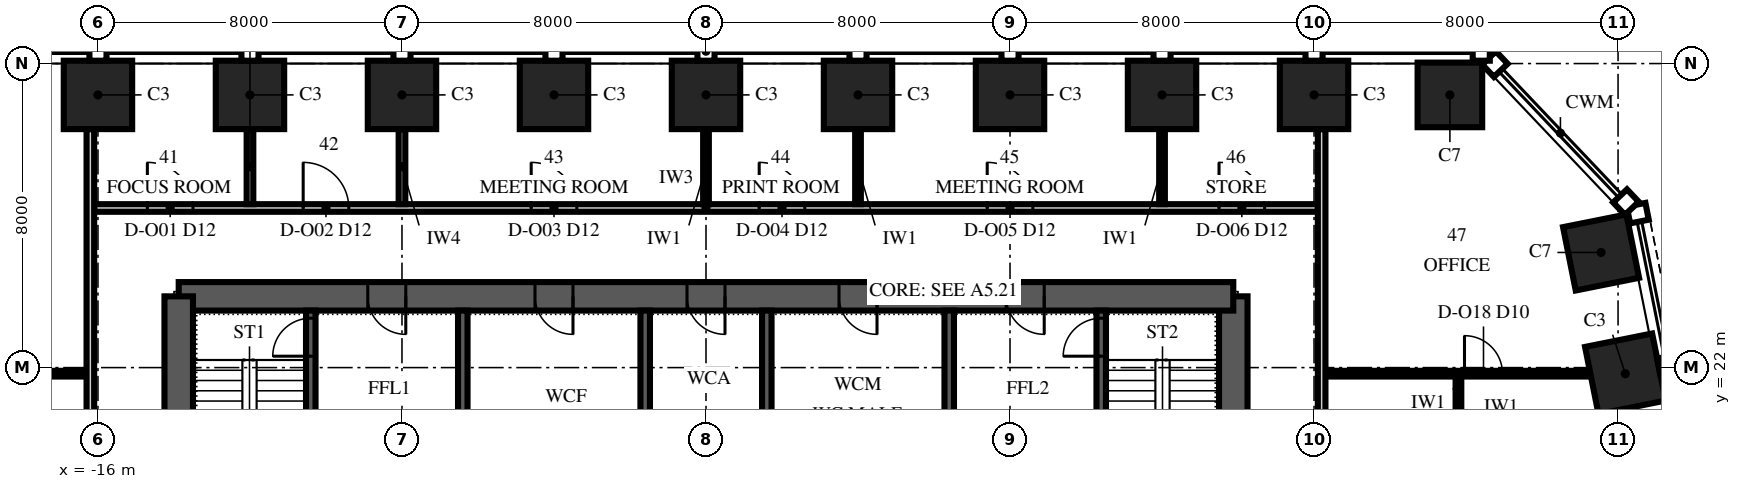
"""IFC4 building model, lengths in metres.
Left out: names, types, materials, properties, quantities, classifications, styles, units other than length and angle.
Written with IfcOpenShell. Run it as: python <this file> out.ifc"""

import sys

from ifc_helpers import new_model, si_unit, direction, frame, frame_2d, origin, origin_2d, place, context, subcontext, project, spatial, polyline, rectangle, outline, extrude, element, fill, save


model = new_model("IFC4")
c1 = context("Model", 3, precision=1e-05, world=origin(), true_north=direction((0.0, 1.0)))
c2 = subcontext(c1, "Body", "Model", "MODEL_VIEW")
j1 = project(units=[si_unit("LENGTHUNIT", "METRE"), si_unit("PLANEANGLEUNIT", "RADIAN")], contexts=[c1])
p1 = place(None, origin())
s1 = spatial("IfcSite", under=j1, at=p1, CompositionType="ELEMENT")
p2 = place(p1, origin())
s2 = spatial("IfcBuilding", under=s1, at=p2, CompositionType="ELEMENT")
p3 = place(p2, frame((0.0, 0.0, 151.0)))
s3 = spatial("IfcBuildingStorey", under=s2, at=p3, CompositionType="ELEMENT", Elevation=151.0)
p4 = place(p3, frame((24.191, 21.838, 0.0), z_axis=(0.0, 0.0, 1.0), x_axis=(-0.196116135138, 0.980580675691, 0.0)))
e1 = element("IfcColumn", 1, at=p4, inside=s3, PredefinedType="COLUMN", context=c2, shape_type="SweptSolid", body=[
    extrude(rectangle(XDim=1.8, YDim=1.8, at=origin_2d()), origin(), (0.0, 0.0, 1.0), 4.0),
])
for number, where, z_axis, x_axis in (
    (2, (23.553, 25.029, 0.0), (0.0, 0.0, 1.0), (-0.196, 0.981, 0.0)),
    (3, (19.575, 29.175, 0.0), (0.0, 0.0, 1.0), (-1.0, 0.0, 0.0)),
):
    element("IfcColumn", number, at=place(p3, frame(where, z_axis=z_axis, x_axis=x_axis)), inside=s3, PredefinedType="COLUMN", context=c2, shape_type="SweptSolid", body=[
        extrude(rectangle(XDim=1.7, YDim=1.7, at=origin_2d()), origin(), (0.0, 0.0, 1.0), 4.0),
    ])
for number, where, z_axis, x_axis in (
    (4, (16.0, 29.175, 0.0), (0.0, 0.0, 1.0), (-1.0, 0.0, 0.0)),
    (5, (12.0, 29.175, 0.0), (0.0, 0.0, 1.0), (-1.0, 0.0, 0.0)),
    (6, (8.0, 29.175, 0.0), (0.0, 0.0, 1.0), (-1.0, 0.0, 0.0)),
    (7, (4.0, 29.175, 0.0), (0.0, 0.0, 1.0), (-1.0, 0.0, 0.0)),
    (8, (0.0, 29.175, 0.0), (0.0, 0.0, 1.0), (-1.0, 0.0, 0.0)),
    (9, (-4.0, 29.175, 0.0), (0.0, 0.0, 1.0), (-1.0, 0.0, 0.0)),
    (10, (-8.0, 29.175, 0.0), (0.0, 0.0, 1.0), (-1.0, 0.0, 0.0)),
    (11, (-12.0, 29.175, 0.0), (0.0, 0.0, 1.0), (-1.0, 0.0, 0.0)),
    (12, (-16.0, 29.175, 0.0), (0.0, 0.0, 1.0), (-1.0, 0.0, 0.0)),
):
    element("IfcColumn", number, at=place(p3, frame(where, z_axis=z_axis, x_axis=x_axis)), inside=s3, PredefinedType="COLUMN", context=c2, shape_type="SweptSolid", body=[
        extrude(rectangle(XDim=1.8, YDim=1.8, at=origin_2d()), origin(), (0.0, 0.0, 1.0), 4.0),
    ])
p5 = place(p3, frame((13.875, 6.125, 0.0), z_axis=(0.0, 0.0, 1.0), x_axis=(0.0, 1.0, 0.0)))
e13 = element("IfcWall", 13, at=p5, inside=s3, PredefinedType="SHEAR", context=c2, shape_type="SweptSolid", body=[
    extrude(outline(polyline([(0.0, -0.375), (17.75, -0.375), (17.75, 0.0), (17.375, 0.0), (17.375, 0.375), (0.375, 0.375), (0.375, 0.0), (0.0, 0.0), (0.0, -0.375)])), origin(), (0.0, 0.0, 1.0), 4.0),
])
p6 = place(p5, frame((4.175, 0.0, 0.0)))
e14 = element("IfcOpeningElement", 14, at=p6, cuts=e13, PredefinedType="OPENING", context=c2, shape_type="SweptSolid", body=[
    extrude(rectangle(XDim=1.8, YDim=2.4, at=frame_2d((0.9, 1.2))), frame((0.0, 0.39, 0.0), z_axis=(0.0, -1.0, 0.0), x_axis=(1.0, 0.0, 0.0)), (0.0, 0.0, 1.0), 0.78),
])
p7 = place(p3, frame((13.875, 23.875, 0.0), z_axis=(0.0, 0.0, 1.0), x_axis=(-1.0, 0.0, 0.0)))
e15 = element("IfcWall", 15, at=p7, inside=s3, PredefinedType="SHEAR", context=c2, shape_type="SweptSolid", body=[
    extrude(rectangle(XDim=27.75, YDim=0.75, at=frame_2d((13.875, 0.0))), origin(), (0.0, 0.0, 1.0), 4.0),
])
p8 = place(p7, frame((21.775, 0.0, 0.0)))
e16 = element("IfcOpeningElement", 16, at=p8, cuts=e15, PredefinedType="OPENING", context=c2, shape_type="SweptSolid", body=[
    extrude(rectangle(XDim=1.0, YDim=2.1, at=frame_2d((0.5, 1.05))), frame((0.0, 0.39, 0.0), z_axis=(0.0, -1.0, 0.0), x_axis=(1.0, 0.0, 0.0)), (0.0, 0.0, 1.0), 0.78),
])
p9 = place(p7, frame((4.975, 0.0, 0.0)))
e17 = element("IfcOpeningElement", 17, at=p9, cuts=e15, PredefinedType="OPENING", context=c2, shape_type="SweptSolid", body=[
    extrude(rectangle(XDim=1.0, YDim=2.1, at=frame_2d((0.5, 1.05))), frame((0.0, 0.39, 0.0), z_axis=(0.0, -1.0, 0.0), x_axis=(1.0, 0.0, 0.0)), (0.0, 0.0, 1.0), 0.78),
])
p10 = place(p7, frame((17.375, 0.0, 0.0)))
e18 = element("IfcOpeningElement", 18, at=p10, cuts=e15, PredefinedType="OPENING", context=c2, shape_type="SweptSolid", body=[
    extrude(rectangle(XDim=1.0, YDim=2.1, at=frame_2d((0.5, 1.05))), frame((0.0, 0.39, 0.0), z_axis=(0.0, -1.0, 0.0), x_axis=(1.0, 0.0, 0.0)), (0.0, 0.0, 1.0), 0.78),
])
p11 = place(p7, frame((13.375, 0.0, 0.0)))
e19 = element("IfcOpeningElement", 19, at=p11, cuts=e15, PredefinedType="OPENING", context=c2, shape_type="SweptSolid", body=[
    extrude(rectangle(XDim=1.0, YDim=2.1, at=frame_2d((0.5, 1.05))), frame((0.0, 0.39, 0.0), z_axis=(0.0, -1.0, 0.0), x_axis=(1.0, 0.0, 0.0)), (0.0, 0.0, 1.0), 0.78),
])
p12 = place(p7, frame((9.375, 0.0, 0.0)))
e20 = element("IfcOpeningElement", 20, at=p12, cuts=e15, PredefinedType="OPENING", context=c2, shape_type="SweptSolid", body=[
    extrude(rectangle(XDim=1.0, YDim=2.1, at=frame_2d((0.5, 1.05))), frame((0.0, 0.39, 0.0), z_axis=(0.0, -1.0, 0.0), x_axis=(1.0, 0.0, 0.0)), (0.0, 0.0, 1.0), 0.78),
])
p13 = place(p3, frame((-13.875, 23.875, 0.0), z_axis=(0.0, 0.0, 1.0), x_axis=(0.0, -1.0, 0.0)))
e21 = element("IfcWall", 21, at=p13, inside=s3, PredefinedType="SHEAR", context=c2, shape_type="SweptSolid", body=[
    extrude(outline(polyline([(0.0, -0.375), (17.75, -0.375), (17.75, 0.0), (17.375, 0.0), (17.375, 0.375), (0.375, 0.375), (0.375, 0.0), (0.0, 0.0), (0.0, -0.375)])), origin(), (0.0, 0.0, 1.0), 4.0),
])
p14 = place(p13, frame((11.775, 0.0, 0.0)))
e22 = element("IfcOpeningElement", 22, at=p14, cuts=e21, PredefinedType="OPENING", context=c2, shape_type="SweptSolid", body=[
    extrude(rectangle(XDim=1.8, YDim=2.4, at=frame_2d((0.9, 1.2))), frame((0.0, 0.39, 0.0), z_axis=(0.0, -1.0, 0.0), x_axis=(1.0, 0.0, 0.0)), (0.0, 0.0, 1.0), 0.78),
])
p15 = place(p3, frame((-10.4, 16.125, 0.0), z_axis=(0.0, 0.0, 1.0), x_axis=(0.0, 1.0, 0.0)))
e23 = element("IfcWall", 23, at=p15, inside=s3, PredefinedType="SHEAR", context=c2, shape_type="SweptSolid", body=[
    extrude(rectangle(XDim=7.375, YDim=0.25, at=frame_2d((3.688, 0.0))), origin(), (0.0, 0.0, 1.0), 4.0),
])
p16 = place(p15, frame((6.175, 0.0, 0.0)))
e24 = element("IfcOpeningElement", 24, at=p16, cuts=e23, PredefinedType="OPENING", context=c2, shape_type="SweptSolid", body=[
    extrude(rectangle(XDim=1.0, YDim=2.1, at=frame_2d((0.5, 1.05))), frame((0.0, 0.14, 0.0), z_axis=(0.0, -1.0, 0.0), x_axis=(1.0, 0.0, 0.0)), (0.0, 0.0, 1.0), 0.28),
])
for number, where, z_axis, x_axis in (
    (25, (-6.4, 16.125, 0.0), (0.0, 0.0, 1.0), (0.0, 1.0, 0.0)),
    (26, (-1.6, 16.125, 0.0), (0.0, 0.0, 1.0), (0.0, 1.0, 0.0)),
    (27, (1.6, 16.125, 0.0), (0.0, 0.0, 1.0), (0.0, 1.0, 0.0)),
    (28, (6.4, 16.125, 0.0), (0.0, 0.0, 1.0), (0.0, 1.0, 0.0)),
):
    element("IfcWall", number, at=place(p3, frame(where, z_axis=z_axis, x_axis=x_axis)), inside=s3, PredefinedType="SHEAR", context=c2, shape_type="SweptSolid", body=[
        extrude(rectangle(XDim=7.375, YDim=0.25, at=frame_2d((3.688, 0.0))), origin(), (0.0, 0.0, 1.0), 4.0),
    ])
p17 = place(p3, frame((10.4, 16.125, 0.0), z_axis=(0.0, 0.0, 1.0), x_axis=(0.0, 1.0, 0.0)))
e29 = element("IfcWall", 29, at=p17, inside=s3, PredefinedType="SHEAR", context=c2, shape_type="SweptSolid", body=[
    extrude(rectangle(XDim=7.375, YDim=0.25, at=frame_2d((3.688, 0.0))), origin(), (0.0, 0.0, 1.0), 4.0),
])
p18 = place(p17, frame((6.175, 0.0, 0.0)))
e30 = element("IfcOpeningElement", 30, at=p18, cuts=e29, PredefinedType="OPENING", context=c2, shape_type="SweptSolid", body=[
    extrude(rectangle(XDim=1.0, YDim=2.1, at=frame_2d((0.5, 1.05))), frame((0.0, 0.14, 0.0), z_axis=(0.0, -1.0, 0.0), x_axis=(1.0, 0.0, 0.0)), (0.0, 0.0, 1.0), 0.28),
])
p19 = place(p3, frame((-19.875, 21.84, 0.0), z_axis=(0.0, 0.0, 1.0), x_axis=(1.0, 0.0, 0.0)))
e31 = element("IfcWall", 31, at=p19, inside=s3, PredefinedType="PARTITIONING", context=c2, shape_type="SweptSolid", body=[
    extrude(rectangle(XDim=3.575, YDim=0.15, at=frame_2d((1.788, 0.0))), origin(), (0.0, 0.0, 1.0), 3.4),
])
p20 = place(p3, frame((16.3, 21.84, 0.0), z_axis=(0.0, 0.0, 1.0), x_axis=(1.0, 0.0, 0.0)))
e32 = element("IfcWall", 32, at=p20, inside=s3, PredefinedType="PARTITIONING", context=c2, shape_type="SweptSolid", body=[
    extrude(rectangle(XDim=6.973, YDim=0.15, at=frame_2d((3.486, 0.0))), origin(), (0.0, 0.0, 1.0), 3.25),
])
p21 = place(p20, frame((3.659, 0.0, 0.0)))
e33 = element("IfcOpeningElement", 33, at=p21, cuts=e32, PredefinedType="OPENING", context=c2, shape_type="SweptSolid", body=[
    extrude(rectangle(XDim=1.0, YDim=2.3, at=frame_2d((0.5, 1.15))), frame((0.0, 0.09, 0.0), z_axis=(0.0, -1.0, 0.0), x_axis=(1.0, 0.0, 0.0)), (0.0, 0.0, 1.0), 0.18),
])
p22 = place(p3, frame((-16.1, 26.2, 0.0), z_axis=(0.0, 0.0, 1.0), x_axis=(1.0, 0.0, 0.0)))
e34 = element("IfcWall", 34, at=p22, inside=s3, PredefinedType="PARTITIONING", context=c2, shape_type="SweptSolid", body=[
    extrude(rectangle(XDim=32.2, YDim=0.2, at=frame_2d((16.1, 0.0))), origin(), (0.0, 0.0, 1.0), 3.4),
])
p23 = place(p22, frame((1.4, 0.0, 0.0)))
e35 = element("IfcOpeningElement", 35, at=p23, cuts=e34, PredefinedType="OPENING", context=c2, shape_type="SweptSolid", body=[
    extrude(rectangle(XDim=1.2, YDim=2.4, at=frame_2d((0.6, 1.2))), frame((0.0, 0.115, 0.0), z_axis=(0.0, -1.0, 0.0), x_axis=(1.0, 0.0, 0.0)), (0.0, 0.0, 1.0), 0.23),
])
p24 = place(p22, frame((5.5, 0.0, 0.0)))
e36 = element("IfcOpeningElement", 36, at=p24, cuts=e34, PredefinedType="OPENING", context=c2, shape_type="SweptSolid", body=[
    extrude(rectangle(XDim=1.2, YDim=2.4, at=frame_2d((0.6, 1.2))), frame((0.0, 0.115, 0.0), z_axis=(0.0, -1.0, 0.0), x_axis=(1.0, 0.0, 0.0)), (0.0, 0.0, 1.0), 0.23),
])
p25 = place(p22, frame((11.5, 0.0, 0.0)))
e37 = element("IfcOpeningElement", 37, at=p25, cuts=e34, PredefinedType="OPENING", context=c2, shape_type="SweptSolid", body=[
    extrude(rectangle(XDim=1.2, YDim=2.4, at=frame_2d((0.6, 1.2))), frame((0.0, 0.115, 0.0), z_axis=(0.0, -1.0, 0.0), x_axis=(1.0, 0.0, 0.0)), (0.0, 0.0, 1.0), 0.23),
])
p26 = place(p22, frame((17.5, 0.0, 0.0)))
e38 = element("IfcOpeningElement", 38, at=p26, cuts=e34, PredefinedType="OPENING", context=c2, shape_type="SweptSolid", body=[
    extrude(rectangle(XDim=1.2, YDim=2.4, at=frame_2d((0.6, 1.2))), frame((0.0, 0.115, 0.0), z_axis=(0.0, -1.0, 0.0), x_axis=(1.0, 0.0, 0.0)), (0.0, 0.0, 1.0), 0.23),
])
p27 = place(p22, frame((23.5, 0.0, 0.0)))
e39 = element("IfcOpeningElement", 39, at=p27, cuts=e34, PredefinedType="OPENING", context=c2, shape_type="SweptSolid", body=[
    extrude(rectangle(XDim=1.2, YDim=2.4, at=frame_2d((0.6, 1.2))), frame((0.0, 0.115, 0.0), z_axis=(0.0, -1.0, 0.0), x_axis=(1.0, 0.0, 0.0)), (0.0, 0.0, 1.0), 0.23),
])
p28 = place(p22, frame((29.6, 0.0, 0.0)))
e40 = element("IfcOpeningElement", 40, at=p28, cuts=e34, PredefinedType="OPENING", context=c2, shape_type="SweptSolid", body=[
    extrude(rectangle(XDim=1.2, YDim=2.4, at=frame_2d((0.6, 1.2))), frame((0.0, 0.115, 0.0), z_axis=(0.0, -1.0, 0.0), x_axis=(1.0, 0.0, 0.0)), (0.0, 0.0, 1.0), 0.23),
])
p29 = place(p3, frame((-16.2, 3.9, 0.0), z_axis=(0.0, 0.0, 1.0), x_axis=(0.0, 1.0, 0.0)))
e41 = element("IfcWall", 41, at=p29, inside=s3, PredefinedType="PARTITIONING", context=c2, shape_type="SweptSolid", body=[
    extrude(rectangle(XDim=24.375, YDim=0.2, at=frame_2d((12.188, 0.0))), origin(), (0.0, 0.0, 1.0), 2.842),
])
p30 = place(p29, frame((7.5, 0.0, 0.0)))
e42 = element("IfcOpeningElement", 42, at=p30, cuts=e41, PredefinedType="OPENING", context=c2, shape_type="SweptSolid", body=[
    extrude(rectangle(XDim=1.2, YDim=2.4, at=frame_2d((0.6, 1.2))), frame((0.0, 0.115, 0.0), z_axis=(0.0, -1.0, 0.0), x_axis=(1.0, 0.0, 0.0)), (0.0, 0.0, 1.0), 0.23),
])
for number, where, z_axis, x_axis in (
    (43, (-12.0, 26.3, 0.0), (0.0, 0.0, 1.0), (0.0, 1.0, 0.0)),
    (44, (-8.0, 26.3, 0.0), (0.0, 0.0, 1.0), (0.0, 1.0, 0.0)),
):
    element("IfcWall", number, at=place(p3, frame(where, z_axis=z_axis, x_axis=x_axis)), inside=s3, PredefinedType="PARTITIONING", context=c2, shape_type="SweptSolid", body=[
        extrude(rectangle(XDim=1.975, YDim=0.175, at=frame_2d((0.987, 0.0))), origin(), (0.0, 0.0, 1.0), 3.4),
    ])
p31 = place(p3, frame((0.0, 26.3, 0.0), z_axis=(0.0, 0.0, 1.0), x_axis=(0.0, 1.0, 0.0)))
e45 = element("IfcWall", 45, at=p31, inside=s3, PredefinedType="PARTITIONING", context=c2, shape_type="SweptSolid", body=[
    extrude(rectangle(XDim=1.975, YDim=0.15, at=frame_2d((0.987, 0.0))), origin(), (0.0, 0.0, 1.0), 3.4),
])
p32 = place(p3, frame((4.0, 26.3, 0.0), z_axis=(0.0, 0.0, 1.0), x_axis=(0.0, 1.0, 0.0)))
e46 = element("IfcWall", 46, at=p32, inside=s3, PredefinedType="PARTITIONING", context=c2, shape_type="SweptSolid", body=[
    extrude(rectangle(XDim=1.975, YDim=0.15, at=frame_2d((0.987, 0.0))), origin(), (0.0, 0.0, 1.0), 3.85),
])
p33 = place(p3, frame((12.0, 26.3, 0.0), z_axis=(0.0, 0.0, 1.0), x_axis=(0.0, 1.0, 0.0)))
e47 = element("IfcWall", 47, at=p33, inside=s3, PredefinedType="PARTITIONING", context=c2, shape_type="SweptSolid", body=[
    extrude(rectangle(XDim=1.975, YDim=0.15, at=frame_2d((0.987, 0.0))), origin(), (0.0, 0.0, 1.0), 3.4),
])
p34 = place(p3, frame((16.2, 3.9, 0.0), z_axis=(0.0, 0.0, 1.0), x_axis=(0.0, 1.0, 0.0)))
e48 = element("IfcWall", 48, at=p34, inside=s3, PredefinedType="PARTITIONING", context=c2, shape_type="SweptSolid", body=[
    extrude(rectangle(XDim=24.375, YDim=0.2, at=frame_2d((12.188, 0.0))), origin(), (0.0, 0.0, 1.0), 2.842),
])
p35 = place(p34, frame((3.1, 0.0, 0.0)))
e49 = element("IfcOpeningElement", 49, at=p35, cuts=e48, PredefinedType="OPENING", context=c2, shape_type="SweptSolid", body=[
    extrude(rectangle(XDim=1.2, YDim=2.4, at=frame_2d((0.6, 1.2))), frame((0.0, 0.115, 0.0), z_axis=(0.0, -1.0, 0.0), x_axis=(1.0, 0.0, 0.0)), (0.0, 0.0, 1.0), 0.23),
])
p36 = place(p34, frame((10.5, 0.0, 0.0)))
e50 = element("IfcOpeningElement", 50, at=p36, cuts=e48, PredefinedType="OPENING", context=c2, shape_type="SweptSolid", body=[
    extrude(rectangle(XDim=1.2, YDim=2.4, at=frame_2d((0.6, 1.2))), frame((0.0, 0.115, 0.0), z_axis=(0.0, -1.0, 0.0), x_axis=(1.0, 0.0, 0.0)), (0.0, 0.0, 1.0), 0.23),
])
p37 = place(p3, frame((19.8, 17.915, 0.0), z_axis=(0.0, 0.0, 1.0), x_axis=(0.0, 1.0, 0.0)))
e51 = element("IfcWall", 51, at=p37, inside=s3, PredefinedType="PARTITIONING", context=c2, shape_type="SweptSolid", body=[
    extrude(rectangle(XDim=3.85, YDim=0.15, at=frame_2d((1.925, 0.0))), origin(), (0.0, 0.0, 1.0), 3.25),
])
p38 = place(p37, frame((1.425, 0.0, 0.0)))
e52 = element("IfcOpeningElement", 52, at=p38, cuts=e51, PredefinedType="OPENING", context=c2, shape_type="SweptSolid", body=[
    extrude(rectangle(XDim=1.0, YDim=2.3, at=frame_2d((0.5, 1.15))), frame((0.0, 0.09, 0.0), z_axis=(0.0, -1.0, 0.0), x_axis=(1.0, 0.0, 0.0)), (0.0, 0.0, 1.0), 0.18),
])
p39 = place(p8, origin())
e53 = element("IfcDoor", 53, at=p39, inside=s3, OperationType="SINGLE_SWING_RIGHT", PredefinedType="DOOR", context=c2, shape_type="SweptSolid", body=[
    extrude(rectangle(XDim=1.0, YDim=2.1, at=frame_2d((0.5, 1.05))), frame((0.0, 0.375, 0.0), z_axis=(0.0, -1.0, 0.0), x_axis=(1.0, 0.0, 0.0)), (0.0, 0.0, 1.0), 0.75),
])
fill(e16, e53)
p40 = place(p9, origin())
e54 = element("IfcDoor", 54, at=p40, inside=s3, OperationType="SINGLE_SWING_RIGHT", PredefinedType="DOOR", context=c2, shape_type="SweptSolid", body=[
    extrude(rectangle(XDim=1.0, YDim=2.1, at=frame_2d((0.5, 1.05))), frame((0.0, 0.375, 0.0), z_axis=(0.0, -1.0, 0.0), x_axis=(1.0, 0.0, 0.0)), (0.0, 0.0, 1.0), 0.75),
])
fill(e17, e54)
p41 = place(p10, origin())
e55 = element("IfcDoor", 55, at=p41, inside=s3, OperationType="SINGLE_SWING_LEFT", PredefinedType="DOOR", context=c2, shape_type="SweptSolid", body=[
    extrude(rectangle(XDim=1.0, YDim=2.1, at=frame_2d((0.5, 1.05))), frame((0.0, 0.375, 0.0), z_axis=(0.0, -1.0, 0.0), x_axis=(1.0, 0.0, 0.0)), (0.0, 0.0, 1.0), 0.75),
])
fill(e18, e55)
p42 = place(p11, origin())
e56 = element("IfcDoor", 56, at=p42, inside=s3, OperationType="SINGLE_SWING_LEFT", PredefinedType="DOOR", context=c2, shape_type="SweptSolid", body=[
    extrude(rectangle(XDim=1.0, YDim=2.1, at=frame_2d((0.5, 1.05))), frame((0.0, 0.375, 0.0), z_axis=(0.0, -1.0, 0.0), x_axis=(1.0, 0.0, 0.0)), (0.0, 0.0, 1.0), 0.75),
])
fill(e19, e56)
p43 = place(p12, origin())
e57 = element("IfcDoor", 57, at=p43, inside=s3, OperationType="SINGLE_SWING_LEFT", PredefinedType="DOOR", context=c2, shape_type="SweptSolid", body=[
    extrude(rectangle(XDim=1.0, YDim=2.1, at=frame_2d((0.5, 1.05))), frame((0.0, 0.375, 0.0), z_axis=(0.0, -1.0, 0.0), x_axis=(1.0, 0.0, 0.0)), (0.0, 0.0, 1.0), 0.75),
])
fill(e20, e57)
p44 = place(p16, origin())
e58 = element("IfcDoor", 58, at=p44, inside=s3, OperationType="SINGLE_SWING_LEFT", PredefinedType="DOOR", context=c2, shape_type="SweptSolid", body=[
    extrude(rectangle(XDim=1.0, YDim=2.1, at=frame_2d((0.5, 1.05))), frame((0.0, 0.125, 0.0), z_axis=(0.0, -1.0, 0.0), x_axis=(1.0, 0.0, 0.0)), (0.0, 0.0, 1.0), 0.25),
])
fill(e24, e58)
p45 = place(p18, origin())
e59 = element("IfcDoor", 59, at=p45, inside=s3, OperationType="SINGLE_SWING_LEFT", PredefinedType="DOOR", context=c2, shape_type="SweptSolid", body=[
    extrude(rectangle(XDim=1.0, YDim=2.1, at=frame_2d((0.5, 1.05))), frame((0.0, 0.125, 0.0), z_axis=(0.0, -1.0, 0.0), x_axis=(1.0, 0.0, 0.0)), (0.0, 0.0, 1.0), 0.25),
])
fill(e30, e59)
p46 = place(p23, origin())
e60 = element("IfcDoor", 60, at=p46, inside=s3, OperationType="SINGLE_SWING_LEFT", PredefinedType="DOOR", context=c2, shape_type="SweptSolid", body=[
    extrude(rectangle(XDim=1.2, YDim=2.4, at=frame_2d((0.6, 1.2))), frame((0.0, 0.1, 0.0), z_axis=(0.0, -1.0, 0.0), x_axis=(1.0, 0.0, 0.0)), (0.0, 0.0, 1.0), 0.199),
])
fill(e35, e60)
p47 = place(p24, origin())
e61 = element("IfcDoor", 61, at=p47, inside=s3, OperationType="SINGLE_SWING_LEFT", PredefinedType="DOOR", context=c2, shape_type="SweptSolid", body=[
    extrude(rectangle(XDim=1.2, YDim=2.4, at=frame_2d((0.6, 1.2))), frame((0.0, 0.1, 0.0), z_axis=(0.0, -1.0, 0.0), x_axis=(1.0, 0.0, 0.0)), (0.0, 0.0, 1.0), 0.199),
])
fill(e36, e61)
p48 = place(p25, origin())
e62 = element("IfcDoor", 62, at=p48, inside=s3, OperationType="SINGLE_SWING_LEFT", PredefinedType="DOOR", context=c2, shape_type="SweptSolid", body=[
    extrude(rectangle(XDim=1.2, YDim=2.4, at=frame_2d((0.6, 1.2))), frame((0.0, 0.1, 0.0), z_axis=(0.0, -1.0, 0.0), x_axis=(1.0, 0.0, 0.0)), (0.0, 0.0, 1.0), 0.199),
])
fill(e37, e62)
p49 = place(p26, origin())
e63 = element("IfcDoor", 63, at=p49, inside=s3, OperationType="SINGLE_SWING_LEFT", PredefinedType="DOOR", context=c2, shape_type="SweptSolid", body=[
    extrude(rectangle(XDim=1.2, YDim=2.4, at=frame_2d((0.6, 1.2))), frame((0.0, 0.1, 0.0), z_axis=(0.0, -1.0, 0.0), x_axis=(1.0, 0.0, 0.0)), (0.0, 0.0, 1.0), 0.199),
])
fill(e38, e63)
p50 = place(p27, origin())
e64 = element("IfcDoor", 64, at=p50, inside=s3, OperationType="SINGLE_SWING_LEFT", PredefinedType="DOOR", context=c2, shape_type="SweptSolid", body=[
    extrude(rectangle(XDim=1.2, YDim=2.4, at=frame_2d((0.6, 1.2))), frame((0.0, 0.1, 0.0), z_axis=(0.0, -1.0, 0.0), x_axis=(1.0, 0.0, 0.0)), (0.0, 0.0, 1.0), 0.199),
])
fill(e39, e64)
p51 = place(p28, origin())
e65 = element("IfcDoor", 65, at=p51, inside=s3, OperationType="SINGLE_SWING_LEFT", PredefinedType="DOOR", context=c2, shape_type="SweptSolid", body=[
    extrude(rectangle(XDim=1.2, YDim=2.4, at=frame_2d((0.6, 1.2))), frame((0.0, 0.1, 0.0), z_axis=(0.0, -1.0, 0.0), x_axis=(1.0, 0.0, 0.0)), (0.0, 0.0, 1.0), 0.199),
])
fill(e40, e65)
p52 = place(p21, origin())
e66 = element("IfcDoor", 66, at=p52, inside=s3, OperationType="SINGLE_SWING_LEFT", PredefinedType="DOOR", context=c2, shape_type="SweptSolid", body=[
    extrude(rectangle(XDim=1.0, YDim=2.3, at=frame_2d((0.5, 1.15))), frame((0.0, 0.075, 0.0), z_axis=(0.0, -1.0, 0.0), x_axis=(1.0, 0.0, 0.0)), (0.0, 0.0, 1.0), 0.149),
])
fill(e33, e66)
save(model, sys.argv[1])
